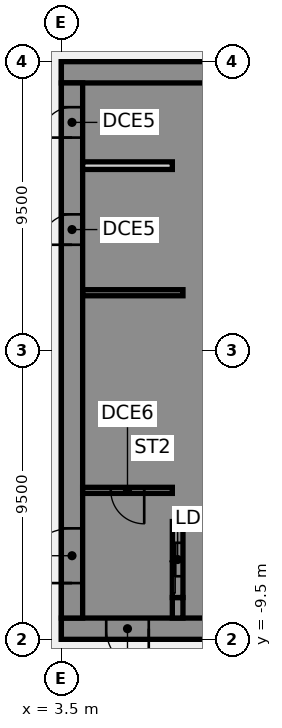
"""IFC4 building model, lengths in metres.
Left out: names, types, materials, properties, quantities, classifications, styles, units other than length and angle.
Written with IfcOpenShell. Run it as: python <this file> out.ifc"""

import sys

from ifc_helpers import new_model, si_unit, direction, frame, frame_2d, origin, place, context, subcontext, project, spatial, polyline, rectangle, outline, extrude, element, fill, save


model = new_model("IFC4")
c1 = context("Model", 3, precision=1e-05, world=origin(), true_north=direction((0.0, 1.0)))
c2 = subcontext(c1, "Body", "Model", "MODEL_VIEW")
j1 = project(units=[si_unit("LENGTHUNIT", "METRE"), si_unit("PLANEANGLEUNIT", "RADIAN")], contexts=[c1])
p1 = place(None, origin())
s1 = spatial("IfcSite", under=j1, at=p1, CompositionType="ELEMENT")
p2 = place(p1, origin())
s2 = spatial("IfcBuilding", under=s1, at=p2, CompositionType="ELEMENT")
p3 = place(p2, frame((0.0, 0.0, 60.25)))
s3 = spatial("IfcBuildingStorey", under=s2, at=p3, CompositionType="ELEMENT", Elevation=60.25)
p4 = place(p3, frame((16.5, -9.15, 0.0), z_axis=(0.0, 0.0, 1.0), x_axis=(-1.0, 0.0, 0.0)))
e1 = element("IfcWall", 1, at=p4, inside=s3, PredefinedType="SHEAR", context=c2, shape_type="SweptSolid", body=[
    extrude(rectangle(XDim=13.0, YDim=0.7, at=frame_2d((6.5, 0.0))), origin(), (0.0, 0.0, 1.0), 3.61),
])
p5 = place(p4, frame((4.15, 0.0, 0.0)))
e2 = element("IfcOpeningElement", 2, at=p5, cuts=e1, PredefinedType="OPENING", context=c2, shape_type="SweptSolid", body=[
    extrude(rectangle(XDim=1.4, YDim=2.1, at=frame_2d((0.7, 1.05))), frame((0.0, 0.36, 0.0), z_axis=(0.0, -1.0, 0.0), x_axis=(1.0, 0.0, 0.0)), (0.0, 0.0, 1.0), 0.72),
])
p6 = place(p4, frame((10.125, 0.0, 0.0)))
e3 = element("IfcOpeningElement", 3, at=p6, cuts=e1, PredefinedType="OPENING", context=c2, shape_type="SweptSolid", body=[
    extrude(rectangle(XDim=1.4, YDim=2.1, at=frame_2d((0.7, 1.05))), frame((0.0, 0.36, 0.0), z_axis=(0.0, -1.0, 0.0), x_axis=(1.0, 0.0, 0.0)), (0.0, 0.0, 1.0), 0.72),
])
p7 = place(p3, frame((16.5, 9.15, 0.0), z_axis=(0.0, 0.0, 1.0), x_axis=(-1.0, 0.0, 0.0)))
e4 = element("IfcWall", 4, at=p7, inside=s3, PredefinedType="SHEAR", context=c2, shape_type="SweptSolid", body=[
    extrude(rectangle(XDim=13.0, YDim=0.7, at=frame_2d((6.5, 0.0))), origin(), (0.0, 0.0, 1.0), 3.61),
])
p8 = place(p3, origin())
e5 = element("IfcWall", 5, at=p8, inside=s3, PredefinedType="SHEAR", context=c2, shape_type="SweptSolid", body=[
    extrude(outline(polyline([(9.8, -5.375), (7.5, -5.375), (7.5, -2.875), (9.8, -2.875), (9.8, -2.625), (7.5, -2.625), (7.5, -0.125), (9.8, -0.125), (9.8, 0.125), (7.5, 0.125), (7.5, 2.625), (9.8, 2.625), (9.8, 2.875), (7.5, 2.875), (7.5, 5.375), (9.8, 5.375), (9.8, 5.625), (7.5, 5.625), (7.5, 8.125), (9.8, 8.125), (9.8, 8.8), (7.5, 8.8), (7.15, 8.8), (7.15, -5.625), (7.5, -5.625), (9.8, -5.625), (9.8, -5.375)])), origin(), (0.0, 0.0, 1.0), 3.61),
])
p9 = place(p3, origin())
e6 = element("IfcWall", 6, at=p9, inside=s3, PredefinedType="SHEAR", context=c2, shape_type="SweptSolid", body=[
    extrude(outline(polyline([(7.5, -8.125), (7.5, -8.8), (9.8, -8.8), (9.8, -8.125), (9.8, -5.625), (9.55, -5.625), (9.55, -8.125), (7.5, -8.125)])), origin(), (0.0, 0.0, 1.0), 3.61),
])
p10 = place(p3, frame((7.325, -8.8, 0.0), z_axis=(0.0, 0.0, 1.0), x_axis=(0.0, 1.0, 0.0)))
e7 = element("IfcWall", 7, at=p10, inside=s3, PredefinedType="SHEAR", context=c2, shape_type="SweptSolid", body=[
    extrude(rectangle(XDim=0.675, YDim=0.35, at=frame_2d((0.337, 0.0))), origin(), (0.0, 0.0, 1.0), 3.61),
])
p11 = place(p3, frame((7.5, 1.9, 0.0), z_axis=(0.0, 0.0, 1.0), x_axis=(-1.0, 0.0, 0.0)))
e8 = element("IfcWall", 8, at=p11, inside=s3, PredefinedType="SHEAR", context=c2, shape_type="SweptSolid", body=[
    extrude(rectangle(XDim=3.3, YDim=0.2, at=frame_2d((1.65, 0.0))), origin(), (0.0, 0.0, 1.0), 3.61),
])
p12 = place(p3, frame((7.325, -8.125, 0.0), z_axis=(0.0, 0.0, 1.0), x_axis=(0.0, 1.0, 0.0)))
e9 = element("IfcWall", 9, at=p12, inside=s3, PredefinedType="SHEAR", context=c2, shape_type="SweptSolid", body=[
    extrude(rectangle(XDim=2.5, YDim=0.35, at=frame_2d((1.25, 0.0))), origin(), (0.0, 0.0, 1.0), 3.61),
])
p13 = place(p12, frame((0.7, 0.0, 0.0)))
e10 = element("IfcOpeningElement", 10, at=p13, cuts=e9, PredefinedType="OPENING", context=c2, shape_type="SweptSolid", body=[
    extrude(rectangle(XDim=1.1, YDim=2.1, at=frame_2d((0.55, 1.05))), frame((0.0, 0.185, 0.0), z_axis=(0.0, -1.0, 0.0), x_axis=(1.0, 0.0, 0.0)), (0.0, 0.0, 1.0), 0.37),
])
p14 = place(p3, frame((3.85, -8.8, 0.0), z_axis=(0.0, 0.0, 1.0), x_axis=(0.0, 1.0, 0.0)))
e11 = element("IfcWall", 11, at=p14, inside=s3, PredefinedType="SHEAR", context=c2, shape_type="SweptSolid", body=[
    extrude(rectangle(XDim=17.6, YDim=0.7, at=frame_2d((8.8, 0.0))), origin(), (0.0, 0.0, 1.0), 3.61),
])
p15 = place(p14, frame((1.15, 0.0, 0.0)))
e12 = element("IfcOpeningElement", 12, at=p15, cuts=e11, PredefinedType="OPENING", context=c2, shape_type="SweptSolid", body=[
    extrude(rectangle(XDim=1.8, YDim=2.1, at=frame_2d((0.9, 1.05))), frame((0.0, 0.36, 0.0), z_axis=(0.0, -1.0, 0.0), x_axis=(1.0, 0.0, 0.0)), (0.0, 0.0, 1.0), 0.72),
])
p16 = place(p14, frame((12.278, 0.0, 0.0)))
e13 = element("IfcOpeningElement", 13, at=p16, cuts=e11, PredefinedType="OPENING", context=c2, shape_type="SweptSolid", body=[
    extrude(rectangle(XDim=1.0, YDim=2.1, at=frame_2d((0.5, 1.05))), frame((0.0, 0.36, 0.0), z_axis=(0.0, -1.0, 0.0), x_axis=(1.0, 0.0, 0.0)), (0.0, 0.0, 1.0), 0.72),
])
p17 = place(p14, frame((15.802, 0.0, 0.0)))
e14 = element("IfcOpeningElement", 14, at=p17, cuts=e11, PredefinedType="OPENING", context=c2, shape_type="SweptSolid", body=[
    extrude(rectangle(XDim=1.0, YDim=2.1, at=frame_2d((0.5, 1.05))), frame((0.0, 0.36, 0.0), z_axis=(0.0, -1.0, 0.0), x_axis=(1.0, 0.0, 0.0)), (0.0, 0.0, 1.0), 0.72),
])
p18 = place(p3, frame((7.15, 6.08, 0.0), z_axis=(0.0, 0.0, 1.0), x_axis=(-1.0, 0.0, 0.0)))
e15 = element("IfcWall", 15, at=p18, inside=s3, PredefinedType="PARTITIONING", context=c2, shape_type="SweptSolid", body=[
    extrude(rectangle(XDim=2.95, YDim=0.25, at=frame_2d((1.475, 0.0))), origin(), (0.0, 0.0, 1.0), 3.61),
])
p19 = place(p3, frame((7.15, -4.6, 0.0), z_axis=(0.0, 0.0, 1.0), x_axis=(-1.0, 0.0, 0.0)))
e16 = element("IfcWall", 16, at=p19, inside=s3, PredefinedType="SHEAR", context=c2, shape_type="SweptSolid", body=[
    extrude(rectangle(XDim=2.95, YDim=0.2, at=frame_2d((1.475, 0.0))), origin(), (0.0, 0.0, 1.0), 3.61),
])
p20 = place(p19, frame((0.925, 0.0, 0.0)))
e17 = element("IfcOpeningElement", 17, at=p20, cuts=e16, PredefinedType="OPENING", context=c2, shape_type="SweptSolid", body=[
    extrude(rectangle(XDim=1.1, YDim=2.1, at=frame_2d((0.55, 1.05))), frame((0.0, 0.11, 0.0), z_axis=(0.0, -1.0, 0.0), x_axis=(1.0, 0.0, 0.0)), (0.0, 0.0, 1.0), 0.22),
])
p21 = place(p6, origin())
e18 = element("IfcDoor", 18, at=p21, inside=s3, OperationType="SINGLE_SWING_LEFT", PredefinedType="DOOR", context=c2, shape_type="SweptSolid", body=[
    extrude(rectangle(XDim=1.4, YDim=2.1, at=frame_2d((0.7, 1.05))), frame((0.0, 0.025, 0.0), z_axis=(0.0, -1.0, 0.0), x_axis=(1.0, 0.0, 0.0)), (0.0, 0.0, 1.0), 0.05),
])
fill(e3, e18)
p22 = place(p15, origin())
e19 = element("IfcDoor", 19, at=p22, inside=s3, OperationType="SINGLE_SWING_LEFT", PredefinedType="DOOR", context=c2, shape_type="SweptSolid", body=[
    extrude(rectangle(XDim=1.8, YDim=2.1, at=frame_2d((0.9, 1.05))), frame((0.0, 0.025, 0.0), z_axis=(0.0, -1.0, 0.0), x_axis=(1.0, 0.0, 0.0)), (0.0, 0.0, 1.0), 0.05),
])
fill(e12, e19)
p23 = place(p16, origin())
e20 = element("IfcDoor", 20, at=p23, inside=s3, OperationType="SINGLE_SWING_LEFT", PredefinedType="DOOR", context=c2, shape_type="SweptSolid", body=[
    extrude(rectangle(XDim=1.0, YDim=2.1, at=frame_2d((0.5, 1.05))), frame((0.0, -0.275, 0.0), z_axis=(0.0, -1.0, 0.0), x_axis=(1.0, 0.0, 0.0)), (0.0, 0.0, 1.0), 0.05),
])
fill(e13, e20)
p24 = place(p17, origin())
e21 = element("IfcDoor", 21, at=p24, inside=s3, OperationType="SINGLE_SWING_LEFT", PredefinedType="DOOR", context=c2, shape_type="SweptSolid", body=[
    extrude(rectangle(XDim=1.0, YDim=2.1, at=frame_2d((0.5, 1.05))), frame((0.0, -0.275, 0.0), z_axis=(0.0, -1.0, 0.0), x_axis=(1.0, 0.0, 0.0)), (0.0, 0.0, 1.0), 0.05),
])
fill(e14, e21)
p25 = place(p20, origin())
e22 = element("IfcDoor", 22, at=p25, inside=s3, OperationType="SINGLE_SWING_LEFT", PredefinedType="DOOR", context=c2, shape_type="SweptSolid", body=[
    extrude(rectangle(XDim=1.1, YDim=2.1, at=frame_2d((0.55, 1.05))), frame((0.0, 0.025, 0.0), z_axis=(0.0, -1.0, 0.0), x_axis=(1.0, 0.0, 0.0)), (0.0, 0.0, 1.0), 0.05),
])
fill(e17, e22)
p26 = place(p13, origin())
e23 = element("IfcDoor", 23, at=p26, inside=s3, OperationType="SLIDING_TO_LEFT", PredefinedType="DOOR", context=c2, shape_type="SweptSolid", body=[
    extrude(rectangle(XDim=1.1, YDim=2.1, at=frame_2d((0.55, 1.05))), frame((0.0, 0.025, 0.0), z_axis=(0.0, -1.0, 0.0), x_axis=(1.0, 0.0, 0.0)), (0.0, 0.0, 1.0), 0.05),
])
fill(e10, e23)
save(model, sys.argv[1])
